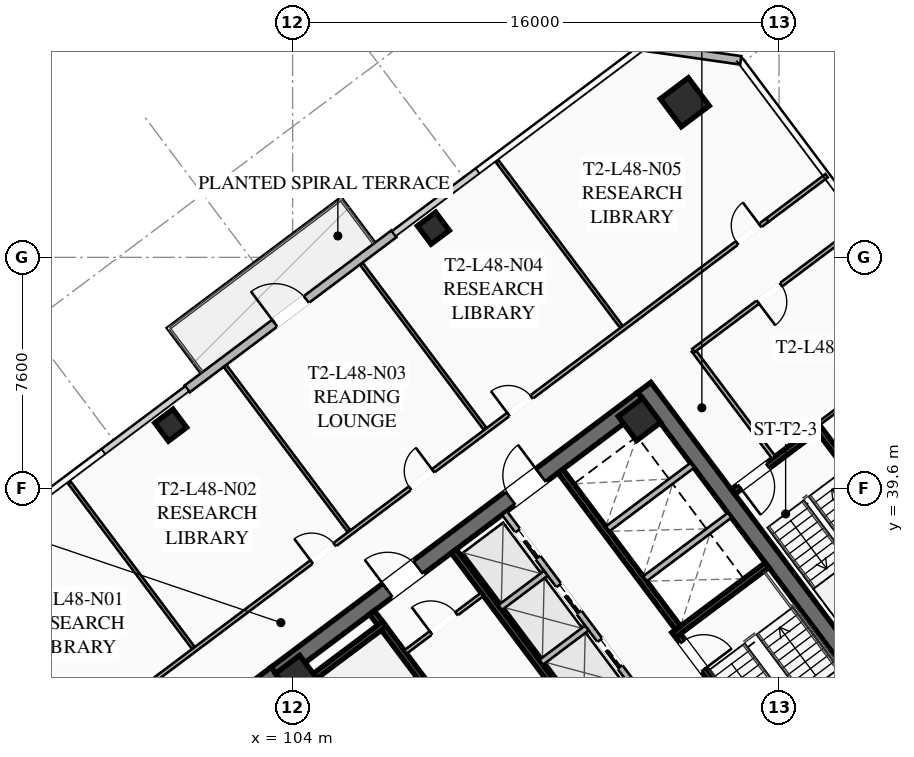
"""IFC4 building model, lengths in metres.
Left out: names, types, materials, properties, quantities, classifications, styles, units other than length and angle.
Written with IfcOpenShell. Run it as: python <this file> out.ifc"""

import sys

from ifc_helpers import new_model, si_unit, direction, frame, frame_2d, origin, origin_2d, place, context, subcontext, project, spatial, rectangle, hollow_rectangle, extrude, element, fill, save


model = new_model("IFC4")
c1 = context("Model", 3, precision=1e-05, world=origin(), true_north=direction((0.0, 1.0)))
c2 = subcontext(c1, "Body", "Model", "MODEL_VIEW")
j1 = project(units=[si_unit("LENGTHUNIT", "METRE"), si_unit("PLANEANGLEUNIT", "RADIAN")], contexts=[c1])
p1 = place(None, origin())
s1 = spatial("IfcSite", under=j1, at=p1, CompositionType="ELEMENT")
p2 = place(p1, origin())
s2 = spatial("IfcBuilding", under=s1, at=p2, CompositionType="ELEMENT")
p3 = place(p2, frame((0.0, 0.0, 178.3)))
s3 = spatial("IfcBuildingStorey", under=s2, at=p3, CompositionType="ELEMENT", Elevation=178.3)
for number, where, z_axis, x_axis in (
    (1, (112.436, 21.077, 0.0), (0.0, 0.0, 1.0), (-0.6, 0.8, 0.0)),
    (2, (115.564, 42.923, 0.0), (0.0, 0.0, 1.0), (0.6, -0.8, 0.0)),
):
    element("IfcWall", number, at=place(p3, frame(where, z_axis=z_axis, x_axis=x_axis)), inside=s3, PredefinedType="SHEAR", context=c2, shape_type="SweptSolid", body=[
        extrude(rectangle(XDim=15.6, YDim=0.55, at=frame_2d((7.8, 0.0))), origin(), (0.0, 0.0, 1.0), 3.55),
    ])
p4 = place(p3, frame((103.461, 33.502, 0.0), z_axis=(0.0, 0.0, 1.0), x_axis=(0.799998054672, 0.600002593761, 0.0)))
e3 = element("IfcWall", 3, at=p4, inside=s3, PredefinedType="SHEAR", context=c2, shape_type="SweptSolid", body=[
    extrude(rectangle(XDim=15.06, YDim=0.55, at=frame_2d((7.53, 0.0))), origin(), (0.0, 0.0, 1.0), 3.55),
])
p5 = place(p4, frame((4.58, 0.0, 0.0)))
e4 = element("IfcOpeningElement", 4, at=p5, cuts=e3, PredefinedType="OPENING", context=c2, shape_type="SweptSolid", body=[
    extrude(rectangle(XDim=1.25, YDim=2.25, at=frame_2d((0.625, 1.125))), frame((0.0, 0.285, 0.0), z_axis=(0.0, -1.0, 0.0), x_axis=(1.0, 0.0, 0.0)), (0.0, 0.0, 1.0), 0.57),
])
p6 = place(p4, frame((9.63, 0.0, 0.0)))
e5 = element("IfcOpeningElement", 5, at=p6, cuts=e3, PredefinedType="OPENING", context=c2, shape_type="SweptSolid", body=[
    extrude(rectangle(XDim=1.25, YDim=2.25, at=frame_2d((0.625, 1.125))), frame((0.0, 0.285, 0.0), z_axis=(0.0, -1.0, 0.0), x_axis=(1.0, 0.0, 0.0)), (0.0, 0.0, 1.0), 0.57),
])
for number, where, z_axis, x_axis in (
    (6, (115.41, 41.87, 0.0), (0.0, 0.0, 1.0), (0.8, 0.6, 0.0)),
    (7, (104.13, 33.41, 0.0), (0.0, 0.0, 1.0), (0.8, 0.6, 0.0)),
):
    element("IfcColumn", number, at=place(p3, frame(where, z_axis=z_axis, x_axis=x_axis)), inside=s3, PredefinedType="COLUMN", context=c2, shape_type="SweptSolid", body=[
        extrude(hollow_rectangle(XDim=1.0, YDim=1.0, WallThickness=0.04, at=origin_2d()), origin(), (0.0, 0.0, 1.0), 3.37),
    ])
p7 = place(p3, frame((116.9, 52.3, 0.0), z_axis=(0.0, 0.0, 1.0), x_axis=(0.799999996291, 0.600000004945, 0.0)))
e8 = element("IfcColumn", 8, at=p7, inside=s3, PredefinedType="COLUMN", context=c2, shape_type="SweptSolid", body=[
    extrude(hollow_rectangle(XDim=1.15, YDim=1.15, WallThickness=0.045, at=origin_2d()), origin(), (0.0, 0.0, 1.0), 3.37),
])
for number, where, z_axis, x_axis in (
    (9, (108.63, 48.16, 0.0), (0.0, 0.0, 1.0), (0.8, 0.6, 0.0)),
    (10, (99.99, 41.68, 0.0), (0.0, 0.0, 1.0), (0.8, 0.6, 0.0)),
):
    element("IfcColumn", number, at=place(p3, frame(where, z_axis=z_axis, x_axis=x_axis)), inside=s3, PredefinedType="COLUMN", context=c2, shape_type="SweptSolid", body=[
        extrude(hollow_rectangle(XDim=0.75, YDim=0.75, WallThickness=0.032, at=origin_2d()), origin(), (0.0, 0.0, 1.0), 3.37),
    ])
p8 = place(p3, frame((100.532, 42.874, 0.0), z_axis=(0.0, 0.0, 1.0), x_axis=(0.799996553335, 0.600004595526, 0.0)))
e11 = element("IfcWall", 11, at=p8, inside=s3, PredefinedType="SOLIDWALL", context=c2, shape_type="SweptSolid", body=[
    extrude(rectangle(XDim=8.5, YDim=0.28, at=frame_2d((4.25, 0.0))), origin(), (0.0, 0.0, 1.0), 3.37),
])
p9 = place(p8, frame((3.6, 0.0, 0.0)))
e12 = element("IfcOpeningElement", 12, at=p9, cuts=e11, PredefinedType="OPENING", context=c2, shape_type="SweptSolid", body=[
    extrude(rectangle(XDim=1.3, YDim=2.15, at=frame_2d((0.65, 1.075))), frame((0.0, 0.15, 0.0), z_axis=(0.0, -1.0, 0.0), x_axis=(1.0, 0.0, 0.0)), (0.0, 0.0, 1.0), 0.3),
])
p10 = place(p3, frame((115.52, 54.14, 0.0), z_axis=(0.0, 0.0, 1.0), x_axis=(0.989950994782, -0.141410847992, 0.0)))
e13 = element("IfcWall", 13, at=p10, inside=s3, PredefinedType="SOLIDWALL", context=c2, shape_type="SweptSolid", body=[
    extrude(rectangle(XDim=3.253, YDim=0.28, at=frame_2d((1.626, 0.0))), origin(), (0.0, 0.0, 1.0), 3.37),
])
p11 = place(p3, frame((111.44, 29.08, 0.0), z_axis=(0.0, 0.0, 1.0), x_axis=(-0.59999029481, 0.8000072788, 0.0)))
e14 = element("IfcWall", 14, at=p11, inside=s3, PredefinedType="SHEAR", context=c2, shape_type="SweptSolid", body=[
    extrude(rectangle(XDim=8.05, YDim=0.2, at=frame_2d((4.025, 0.0))), origin(), (0.0, 0.0, 1.0), 3.37),
])
p12 = place(p11, frame((0.45, 0.0, 0.0)))
e15 = element("IfcOpeningElement", 15, at=p12, cuts=e14, PredefinedType="OPENING", context=c2, shape_type="SweptSolid", body=[
    extrude(rectangle(XDim=1.15, YDim=2.2, at=frame_2d((0.575, 1.1))), frame((0.0, 0.11, 0.0), z_axis=(0.0, -1.0, 0.0), x_axis=(1.0, 0.0, 0.0)), (0.0, 0.0, 1.0), 0.22),
])
p13 = place(p3, frame((103.956, 32.842, 0.0), z_axis=(0.0, 0.0, 1.0), x_axis=(0.800015298837, 0.599979601008, 0.0)))
e16 = element("IfcWall", 16, at=p13, inside=s3, PredefinedType="SHEAR", context=c2, shape_type="SweptSolid", body=[
    extrude(rectangle(XDim=3.83, YDim=0.2, at=frame_2d((1.915, 0.0))), origin(), (0.0, 0.0, 1.0), 3.37),
])
p14 = place(p3, frame((116.56, 34.92, 0.0), z_axis=(0.0, 0.0, 1.0), x_axis=(0.59999029481, -0.8000072788, 0.0)))
e17 = element("IfcWall", 17, at=p14, inside=s3, PredefinedType="SHEAR", context=c2, shape_type="SweptSolid", body=[
    extrude(rectangle(XDim=8.05, YDim=0.2, at=frame_2d((4.025, 0.0))), origin(), (0.0, 0.0, 1.0), 3.37),
])
p15 = place(p14, frame((0.45, 0.0, 0.0)))
e18 = element("IfcOpeningElement", 18, at=p15, cuts=e17, PredefinedType="OPENING", context=c2, shape_type="SweptSolid", body=[
    extrude(rectangle(XDim=1.15, YDim=2.2, at=frame_2d((0.575, 1.1))), frame((0.0, 0.11, 0.0), z_axis=(0.0, -1.0, 0.0), x_axis=(1.0, 0.0, 0.0)), (0.0, 0.0, 1.0), 0.22),
])
p16 = place(p3, frame((116.54, 34.78, 0.0), z_axis=(0.0, 0.0, 1.0), x_axis=(0.800015298837, 0.599979601008, 0.0)))
e19 = element("IfcWall", 19, at=p16, inside=s3, PredefinedType="SHEAR", context=c2, shape_type="SweptSolid", body=[
    extrude(rectangle(XDim=3.83, YDim=0.2, at=frame_2d((1.915, 0.0))), origin(), (0.0, 0.0, 1.0), 3.37),
])
p17 = place(p3, frame((117.998, 25.936, 0.0), z_axis=(0.0, 0.0, 1.0), x_axis=(-0.600002693989, 0.799997979501, 0.0)))
e20 = element("IfcWall", 20, at=p17, inside=s3, PredefinedType="SHEAR", context=c2, shape_type="SweptSolid", body=[
    extrude(rectangle(XDim=14.5, YDim=0.2, at=frame_2d((7.25, 0.0))), origin(), (0.0, 0.0, 1.0), 3.37),
])
p18 = place(p3, frame((112.81, 40.17, 0.0), z_axis=(0.0, 0.0, 1.0), x_axis=(0.599993943644, -0.800004542231, 0.0)))
e21 = element("IfcWall", 21, at=p18, inside=s3, PredefinedType="SHEAR", context=c2, shape_type="SweptSolid", body=[
    extrude(rectangle(XDim=6.45, YDim=0.2, at=frame_2d((3.225, 0.0))), origin(), (0.0, 0.0, 1.0), 3.37),
])
for number, where, z_axis, x_axis in (
    (22, (115.59, 36.63, 0.0), (0.0, 0.0, 1.0), (0.8, 0.6, 0.0)),
    (23, (114.36, 38.27, 0.0), (0.0, 0.0, 1.0), (0.8, 0.6, 0.0)),
):
    element("IfcWall", number, at=place(p3, frame(where, z_axis=z_axis, x_axis=x_axis)), inside=s3, PredefinedType="SOLIDWALL", context=c2, shape_type="SweptSolid", body=[
        extrude(rectangle(XDim=3.48, YDim=0.2, at=frame_2d((1.74, 0.0))), origin(), (0.0, 0.0, 1.0), 3.37),
    ])
p19 = place(p3, frame((107.71, 34.22, 0.0), z_axis=(0.0, 0.0, 1.0), x_axis=(0.799981399002, 0.60002480053, 0.0)))
e24 = element("IfcWall", 24, at=p19, inside=s3, PredefinedType="PARTITIONING", context=c2, shape_type="SweptSolid", body=[
    extrude(rectangle(XDim=3.15, YDim=0.135, at=frame_2d((1.575, 0.0))), origin(), (0.0, 0.0, 1.0), 2.723),
])
p20 = place(p19, frame((1.05, 0.0, 0.0)))
e25 = element("IfcOpeningElement", 25, at=p20, cuts=e24, PredefinedType="OPENING", context=c2, shape_type="SweptSolid", body=[
    extrude(rectangle(XDim=1.05, YDim=2.2, at=frame_2d((0.525, 1.1))), frame((0.0, 0.077, 0.0), z_axis=(0.0, -1.0, 0.0), x_axis=(1.0, 0.0, 0.0)), (0.0, 0.0, 1.0), 0.155),
])
p21 = place(p3, frame((115.11, 33.27, 0.0), z_axis=(0.0, 0.0, 1.0), x_axis=(-0.600011322243, 0.799991508192, 0.0)))
e26 = element("IfcWall", 26, at=p21, inside=s3, PredefinedType="SOLIDWALL", context=c2, shape_type="SweptSolid", body=[
    extrude(rectangle(XDim=6.9, YDim=0.2, at=frame_2d((3.45, 0.0))), origin(), (0.0, 0.0, 1.0), 3.37),
])
p22 = place(p21, frame((0.575, 0.0, 0.0)))
e27 = element("IfcOpeningElement", 27, at=p22, cuts=e26, PredefinedType="OPENING", context=c2, shape_type="SweptSolid", body=[
    extrude(rectangle(XDim=1.1, YDim=2.2, at=frame_2d((0.55, 1.1))), frame((0.0, 0.11, 0.0), z_axis=(0.0, -1.0, 0.0), x_axis=(1.0, 0.0, 0.0)), (0.0, 0.0, 1.0), 0.22),
])
p23 = place(p21, frame((2.825, 0.0, 0.0)))
e28 = element("IfcOpeningElement", 28, at=p23, cuts=e26, PredefinedType="OPENING", context=c2, shape_type="SweptSolid", body=[
    extrude(rectangle(XDim=1.1, YDim=2.2, at=frame_2d((0.55, 1.1))), frame((0.0, 0.11, 0.0), z_axis=(0.0, -1.0, 0.0), x_axis=(1.0, 0.0, 0.0)), (0.0, 0.0, 1.0), 0.22),
])
p24 = place(p21, frame((5.075, 0.0, 0.0)))
e29 = element("IfcOpeningElement", 29, at=p24, cuts=e26, PredefinedType="OPENING", context=c2, shape_type="SweptSolid", body=[
    extrude(rectangle(XDim=1.1, YDim=2.2, at=frame_2d((0.55, 1.1))), frame((0.0, 0.11, 0.0), z_axis=(0.0, -1.0, 0.0), x_axis=(1.0, 0.0, 0.0)), (0.0, 0.0, 1.0), 0.22),
])
p25 = place(p3, frame((112.176, 33.882, 0.0), z_axis=(0.0, 0.0, 1.0), x_axis=(0.8, 0.6, 0.0)))
e30 = element("IfcWall", 30, at=p25, inside=s3, PredefinedType="SOLIDWALL", context=c2, shape_type="SweptSolid", body=[
    extrude(rectangle(XDim=1.88, YDim=0.2, at=frame_2d((0.94, 0.0))), origin(), (0.0, 0.0, 1.0), 3.37),
])
p26 = place(p3, frame((110.826, 35.682, 0.0), z_axis=(0.0, 0.0, 1.0), x_axis=(0.799984418148, 0.600020775241, 0.0)))
e31 = element("IfcWall", 31, at=p26, inside=s3, PredefinedType="SOLIDWALL", context=c2, shape_type="SweptSolid", body=[
    extrude(rectangle(XDim=1.88, YDim=0.2, at=frame_2d((0.94, 0.0))), origin(), (0.0, 0.0, 1.0), 3.37),
])
p27 = place(p3, frame((125.304, 36.228, 0.0), z_axis=(0.0, 0.0, 1.0), x_axis=(-0.59998851072, 0.800008616831, 0.0)))
e32 = element("IfcWall", 32, at=p27, inside=s3, PredefinedType="SHEAR", context=c2, shape_type="SweptSolid", body=[
    extrude(rectangle(XDim=6.8, YDim=0.2, at=frame_2d((3.4, 0.0))), origin(), (0.0, 0.0, 1.0), 3.37),
])
p28 = place(p3, frame((121.204, 41.528, 0.0), z_axis=(0.0, 0.0, 1.0), x_axis=(-0.800017232136, -0.599977023131, 0.0)))
e33 = element("IfcWall", 33, at=p28, inside=s3, PredefinedType="SHEAR", context=c2, shape_type="SweptSolid", body=[
    extrude(rectangle(XDim=3.4, YDim=0.2, at=frame_2d((1.7, 0.0))), origin(), (0.0, 0.0, 1.0), 3.37),
])
p29 = place(p28, frame((1.975, 0.0, 0.0)))
e34 = element("IfcOpeningElement", 34, at=p29, cuts=e33, PredefinedType="OPENING", context=c2, shape_type="SweptSolid", body=[
    extrude(rectangle(XDim=1.15, YDim=2.2, at=frame_2d((0.575, 1.1))), frame((0.0, 0.11, 0.0), z_axis=(0.0, -1.0, 0.0), x_axis=(1.0, 0.0, 0.0)), (0.0, 0.0, 1.0), 0.22),
])
p30 = place(p3, frame((119.824, 40.618, 0.0), z_axis=(0.0, 0.0, 1.0), x_axis=(-0.599982243973, 0.800013316712, 0.0)))
e35 = element("IfcWall", 35, at=p30, inside=s3, PredefinedType="PARTITIONING", context=c2, shape_type="SweptSolid", body=[
    extrude(rectangle(XDim=4.4, YDim=0.135, at=frame_2d((2.2, 0.0))), origin(), (0.0, 0.0, 1.0), 2.723),
])
p31 = place(p3, frame((96.658, 31.206, 0.0), z_axis=(0.0, 0.0, 1.0), x_axis=(0.8, 0.6, 0.0)))
e36 = element("IfcWall", 36, at=p31, inside=s3, PredefinedType="PARTITIONING", context=c2, shape_type="SweptSolid", body=[
    extrude(rectangle(XDim=28.7, YDim=0.135, at=frame_2d((14.35, 0.0))), origin(), (0.0, 0.0, 1.0), 2.723),
])
p32 = place(p31, frame((0.3, 0.0, 0.0)))
e37 = element("IfcOpeningElement", 37, at=p32, cuts=e36, PredefinedType="OPENING", context=c2, shape_type="SweptSolid", body=[
    extrude(rectangle(XDim=0.95, YDim=2.05, at=frame_2d((0.475, 1.025))), frame((0.0, 0.077, 0.0), z_axis=(0.0, -1.0, 0.0), x_axis=(1.0, 0.0, 0.0)), (0.0, 0.0, 1.0), 0.155),
])
p33 = place(p31, frame((9.959, 0.0, 0.0)))
e38 = element("IfcOpeningElement", 38, at=p33, cuts=e36, PredefinedType="OPENING", context=c2, shape_type="SweptSolid", body=[
    extrude(rectangle(XDim=0.95, YDim=2.05, at=frame_2d((0.475, 1.025))), frame((0.0, 0.077, 0.0), z_axis=(0.0, -1.0, 0.0), x_axis=(1.0, 0.0, 0.0)), (0.0, 0.0, 1.0), 0.155),
])
p34 = place(p31, frame((14.005, 0.0, 0.0)))
e39 = element("IfcOpeningElement", 39, at=p34, cuts=e36, PredefinedType="OPENING", context=c2, shape_type="SweptSolid", body=[
    extrude(rectangle(XDim=0.95, YDim=2.05, at=frame_2d((0.475, 1.025))), frame((0.0, 0.077, 0.0), z_axis=(0.0, -1.0, 0.0), x_axis=(1.0, 0.0, 0.0)), (0.0, 0.0, 1.0), 0.155),
])
p35 = place(p31, frame((18.049, 0.0, 0.0)))
e40 = element("IfcOpeningElement", 40, at=p35, cuts=e36, PredefinedType="OPENING", context=c2, shape_type="SweptSolid", body=[
    extrude(rectangle(XDim=0.95, YDim=2.05, at=frame_2d((0.475, 1.025))), frame((0.0, 0.077, 0.0), z_axis=(0.0, -1.0, 0.0), x_axis=(1.0, 0.0, 0.0)), (0.0, 0.0, 1.0), 0.155),
])
p36 = place(p31, frame((27.45, 0.0, 0.0)))
e41 = element("IfcOpeningElement", 41, at=p36, cuts=e36, PredefinedType="OPENING", context=c2, shape_type="SweptSolid", body=[
    extrude(rectangle(XDim=0.95, YDim=2.05, at=frame_2d((0.475, 1.025))), frame((0.0, 0.077, 0.0), z_axis=(0.0, -1.0, 0.0), x_axis=(1.0, 0.0, 0.0)), (0.0, 0.0, 1.0), 0.155),
])
p37 = place(p3, frame((119.618, 48.426, 0.0), z_axis=(0.0, 0.0, 1.0), x_axis=(0.800012055778, 0.599983925293, 0.0)))
e42 = element("IfcWall", 42, at=p37, inside=s3, PredefinedType="PARTITIONING", context=c2, shape_type="SweptSolid", body=[
    extrude(rectangle(XDim=2.43, YDim=0.135, at=frame_2d((1.215, 0.0))), origin(), (0.0, 0.0, 1.0), 2.723),
])
p38 = place(p3, frame((100.73, 34.36, 0.0), z_axis=(0.0, 0.0, 1.0), x_axis=(-0.6, 0.8, 0.0)))
e43 = element("IfcWall", 43, at=p38, inside=s3, PredefinedType="PARTITIONING", context=c2, shape_type="SweptSolid", body=[
    extrude(rectangle(XDim=6.78, YDim=0.11, at=frame_2d((3.39, 0.0))), origin(), (0.0, 0.0, 1.0), 2.723),
])
for number, where, z_axis, x_axis in (
    (44, (105.85, 38.2, 0.0), (0.0, 0.0, 1.0), (-0.6, 0.8, 0.0)),
    (45, (110.33, 41.56, 0.0), (0.0, 0.0, 1.0), (-0.6, 0.8, 0.0)),
    (46, (114.81, 44.92, 0.0), (0.0, 0.0, 1.0), (-0.6, 0.8, 0.0)),
):
    element("IfcWall", number, at=place(p3, frame(where, z_axis=z_axis, x_axis=x_axis)), inside=s3, PredefinedType="PARTITIONING", context=c2, shape_type="SweptSolid", body=[
        extrude(rectangle(XDim=6.78, YDim=0.11, at=frame_2d((3.39, 0.0))), origin(), (0.0, 0.0, 1.0), 2.723),
    ])
p39 = place(p3, frame((122.744, 48.308, 0.0), z_axis=(0.0, 0.0, 1.0), x_axis=(-0.79997892247, -0.600028102345, 0.0)))
e47 = element("IfcWall", 47, at=p39, inside=s3, PredefinedType="PARTITIONING", context=c2, shape_type="SweptSolid", body=[
    extrude(rectangle(XDim=6.95, YDim=0.135, at=frame_2d((3.475, 0.0))), origin(), (0.0, 0.0, 1.0), 2.723),
])
p40 = place(p39, frame((3.35, 0.0, 0.0)))
e48 = element("IfcOpeningElement", 48, at=p40, cuts=e47, PredefinedType="OPENING", context=c2, shape_type="SweptSolid", body=[
    extrude(rectangle(XDim=0.95, YDim=2.05, at=frame_2d((0.475, 1.025))), frame((0.0, 0.077, 0.0), z_axis=(0.0, -1.0, 0.0), x_axis=(1.0, 0.0, 0.0)), (0.0, 0.0, 1.0), 0.155),
])
p41 = place(p3, frame((125.384, 44.788, 0.0), z_axis=(0.0, 0.0, 1.0), x_axis=(-0.8, -0.6, 0.0)))
e49 = element("IfcWall", 49, at=p41, inside=s3, PredefinedType="PARTITIONING", context=c2, shape_type="SweptSolid", body=[
    extrude(rectangle(XDim=5.1, YDim=0.11, at=frame_2d((2.55, 0.0))), origin(), (0.0, 0.0, 1.0), 2.723),
])
p42 = place(p9, origin())
e50 = element("IfcDoor", 50, at=p42, inside=s3, OperationType="SINGLE_SWING_LEFT", PredefinedType="DOOR", context=c2, shape_type="SweptSolid", body=[
    extrude(rectangle(XDim=1.3, YDim=2.15, at=frame_2d((0.65, 1.075))), frame((0.0, 0.025, 0.0), z_axis=(0.0, -1.0, 0.0), x_axis=(1.0, 0.0, 0.0)), (0.0, 0.0, 1.0), 0.05),
])
fill(e12, e50)
p43 = place(p5, origin())
e51 = element("IfcDoor", 51, at=p43, inside=s3, OperationType="SINGLE_SWING_LEFT", PredefinedType="DOOR", context=c2, shape_type="SweptSolid", body=[
    extrude(rectangle(XDim=1.25, YDim=2.25, at=frame_2d((0.625, 1.125))), frame((0.0, 0.025, 0.0), z_axis=(0.0, -1.0, 0.0), x_axis=(1.0, 0.0, 0.0)), (0.0, 0.0, 1.0), 0.05),
])
fill(e4, e51)
p44 = place(p6, origin())
e52 = element("IfcDoor", 52, at=p44, inside=s3, OperationType="SINGLE_SWING_RIGHT", PredefinedType="DOOR", context=c2, shape_type="SweptSolid", body=[
    extrude(rectangle(XDim=1.25, YDim=2.25, at=frame_2d((0.625, 1.125))), frame((0.0, 0.025, 0.0), z_axis=(0.0, -1.0, 0.0), x_axis=(1.0, 0.0, 0.0)), (0.0, 0.0, 1.0), 0.05),
])
fill(e5, e52)
p45 = place(p15, origin())
e53 = element("IfcDoor", 53, at=p45, inside=s3, OperationType="SINGLE_SWING_RIGHT", PredefinedType="DOOR", context=c2, shape_type="SweptSolid", body=[
    extrude(rectangle(XDim=1.15, YDim=2.2, at=frame_2d((0.575, 1.1))), frame((0.0, 0.025, 0.0), z_axis=(0.0, -1.0, 0.0), x_axis=(1.0, 0.0, 0.0)), (0.0, 0.0, 1.0), 0.05),
])
fill(e18, e53)
p46 = place(p20, origin())
e54 = element("IfcDoor", 54, at=p46, inside=s3, OperationType="SINGLE_SWING_LEFT", PredefinedType="DOOR", context=c2, shape_type="SweptSolid", body=[
    extrude(rectangle(XDim=1.05, YDim=2.2, at=frame_2d((0.525, 1.1))), frame((0.0, 0.025, 0.0), z_axis=(0.0, -1.0, 0.0), x_axis=(1.0, 0.0, 0.0)), (0.0, 0.0, 1.0), 0.05),
])
fill(e25, e54)
p47 = place(p29, origin())
e55 = element("IfcDoor", 55, at=p47, inside=s3, OperationType="SINGLE_SWING_RIGHT", PredefinedType="DOOR", context=c2, shape_type="SweptSolid", body=[
    extrude(rectangle(XDim=1.15, YDim=2.2, at=frame_2d((0.575, 1.1))), frame((0.0, 0.025, 0.0), z_axis=(0.0, -1.0, 0.0), x_axis=(1.0, 0.0, 0.0)), (0.0, 0.0, 1.0), 0.05),
])
fill(e34, e55)
p48 = place(p33, origin())
e56 = element("IfcDoor", 56, at=p48, inside=s3, OperationType="SINGLE_SWING_LEFT", PredefinedType="DOOR", context=c2, shape_type="SweptSolid", body=[
    extrude(rectangle(XDim=0.95, YDim=2.05, at=frame_2d((0.475, 1.025))), frame((0.0, 0.025, 0.0), z_axis=(0.0, -1.0, 0.0), x_axis=(1.0, 0.0, 0.0)), (0.0, 0.0, 1.0), 0.05),
])
fill(e38, e56)
p49 = place(p34, origin())
e57 = element("IfcDoor", 57, at=p49, inside=s3, OperationType="SINGLE_SWING_RIGHT", PredefinedType="DOOR", context=c2, shape_type="SweptSolid", body=[
    extrude(rectangle(XDim=0.95, YDim=2.05, at=frame_2d((0.475, 1.025))), frame((0.0, 0.025, 0.0), z_axis=(0.0, -1.0, 0.0), x_axis=(1.0, 0.0, 0.0)), (0.0, 0.0, 1.0), 0.05),
])
fill(e39, e57)
p50 = place(p35, origin())
e58 = element("IfcDoor", 58, at=p50, inside=s3, OperationType="SINGLE_SWING_LEFT", PredefinedType="DOOR", context=c2, shape_type="SweptSolid", body=[
    extrude(rectangle(XDim=0.95, YDim=2.05, at=frame_2d((0.475, 1.025))), frame((0.0, 0.025, 0.0), z_axis=(0.0, -1.0, 0.0), x_axis=(1.0, 0.0, 0.0)), (0.0, 0.0, 1.0), 0.05),
])
fill(e40, e58)
p51 = place(p36, origin())
e59 = element("IfcDoor", 59, at=p51, inside=s3, OperationType="SINGLE_SWING_RIGHT", PredefinedType="DOOR", context=c2, shape_type="SweptSolid", body=[
    extrude(rectangle(XDim=0.95, YDim=2.05, at=frame_2d((0.475, 1.025))), frame((0.0, 0.025, 0.0), z_axis=(0.0, -1.0, 0.0), x_axis=(1.0, 0.0, 0.0)), (0.0, 0.0, 1.0), 0.05),
])
fill(e41, e59)
p52 = place(p40, origin())
e60 = element("IfcDoor", 60, at=p52, inside=s3, OperationType="SINGLE_SWING_RIGHT", PredefinedType="DOOR", context=c2, shape_type="SweptSolid", body=[
    extrude(rectangle(XDim=0.95, YDim=2.05, at=frame_2d((0.475, 1.025))), frame((0.0, 0.025, 0.0), z_axis=(0.0, -1.0, 0.0), x_axis=(1.0, 0.0, 0.0)), (0.0, 0.0, 1.0), 0.05),
])
fill(e48, e60)
p53 = place(p22, origin())
e61 = element("IfcDoor", 61, at=p53, inside=s3, OperationType="SLIDING_TO_LEFT", PredefinedType="DOOR", context=c2, shape_type="SweptSolid", body=[
    extrude(rectangle(XDim=1.1, YDim=2.2, at=frame_2d((0.55, 1.1))), frame((0.0, 0.025, 0.0), z_axis=(0.0, -1.0, 0.0), x_axis=(1.0, 0.0, 0.0)), (0.0, 0.0, 1.0), 0.05),
])
fill(e27, e61)
p54 = place(p23, origin())
e62 = element("IfcDoor", 62, at=p54, inside=s3, OperationType="SLIDING_TO_LEFT", PredefinedType="DOOR", context=c2, shape_type="SweptSolid", body=[
    extrude(rectangle(XDim=1.1, YDim=2.2, at=frame_2d((0.55, 1.1))), frame((0.0, 0.025, 0.0), z_axis=(0.0, -1.0, 0.0), x_axis=(1.0, 0.0, 0.0)), (0.0, 0.0, 1.0), 0.05),
])
fill(e28, e62)
p55 = place(p24, origin())
e63 = element("IfcDoor", 63, at=p55, inside=s3, OperationType="SLIDING_TO_LEFT", PredefinedType="DOOR", context=c2, shape_type="SweptSolid", body=[
    extrude(rectangle(XDim=1.1, YDim=2.2, at=frame_2d((0.55, 1.1))), frame((0.0, 0.025, 0.0), z_axis=(0.0, -1.0, 0.0), x_axis=(1.0, 0.0, 0.0)), (0.0, 0.0, 1.0), 0.05),
])
fill(e29, e63)
save(model, sys.argv[1])
